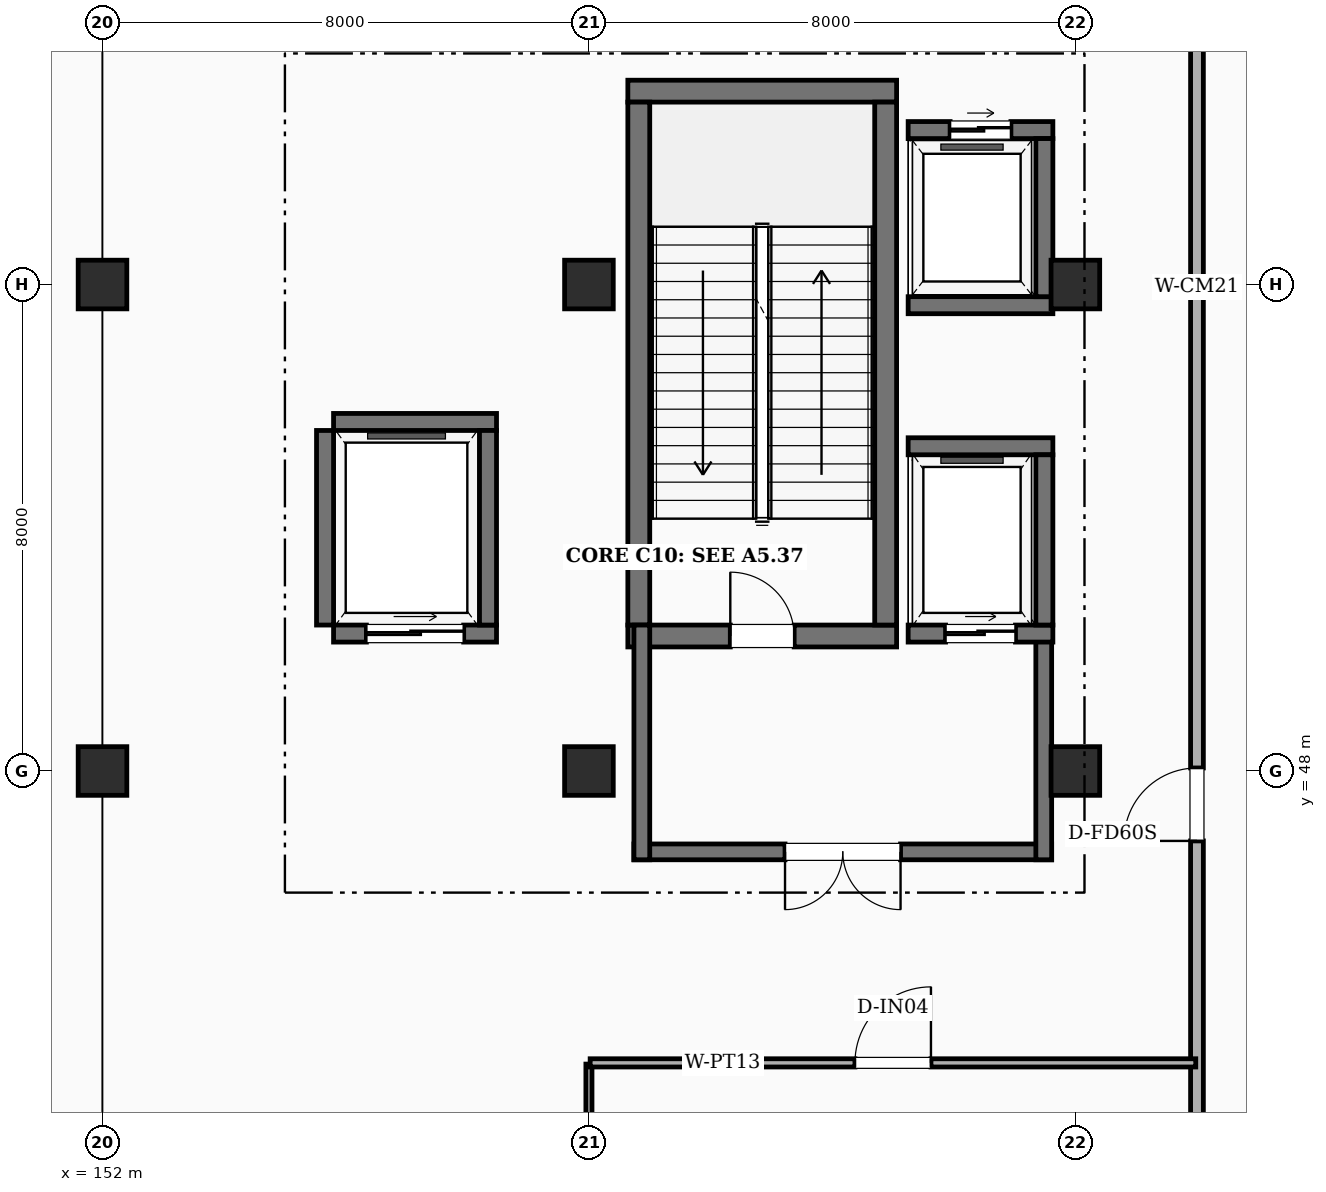
"""IFC4 building model, lengths in metres.
Left out: names, types, materials, properties, quantities, classifications, styles, units other than length and angle.
Written with IfcOpenShell. Run it as: python <this file> out.ifc"""

import sys

from ifc_helpers import new_model, si_unit, direction, frame, frame_2d, origin, origin_2d, place, context, subcontext, project, spatial, rectangle, extrude, element, fill, save


model = new_model("IFC4")
c1 = context("Model", 3, precision=1e-05, world=origin(), true_north=direction((0.0, 1.0)))
c2 = subcontext(c1, "Body", "Model", "MODEL_VIEW")
j1 = project(units=[si_unit("LENGTHUNIT", "METRE"), si_unit("PLANEANGLEUNIT", "RADIAN")], contexts=[c1])
p1 = place(None, origin())
s1 = spatial("IfcSite", under=j1, at=p1, CompositionType="ELEMENT")
p2 = place(p1, origin())
s2 = spatial("IfcBuilding", under=s1, at=p2, CompositionType="ELEMENT")
p3 = place(p2, origin())
s3 = spatial("IfcBuildingStorey", under=s2, at=p3, CompositionType="ELEMENT", Elevation=0.0)
for number, where, z_axis, x_axis in (
    (1, (152.0, 48.0, 0.0), (0.0, 0.0, 1.0), (1.0, 0.0, 0.0)),
    (2, (152.0, 56.0, 0.0), (0.0, 0.0, 1.0), (1.0, 0.0, 0.0)),
    (3, (160.0, 48.0, 0.0), (0.0, 0.0, 1.0), (1.0, 0.0, 0.0)),
    (4, (160.0, 56.0, 0.0), (0.0, 0.0, 1.0), (1.0, 0.0, 0.0)),
    (5, (168.0, 48.0, 0.0), (0.0, 0.0, 1.0), (1.0, 0.0, 0.0)),
    (6, (168.0, 56.0, 0.0), (0.0, 0.0, 1.0), (1.0, 0.0, 0.0)),
):
    element("IfcColumn", number, at=place(p3, frame(where, z_axis=z_axis, x_axis=x_axis)), inside=s3, PredefinedType="COLUMN", context=c2, shape_type="SweptSolid", body=[
        extrude(rectangle(XDim=0.8, YDim=0.8, at=origin_2d()), origin(), (0.0, 0.0, 1.0), 5.4),
    ])
p4 = place(p3, frame((160.64, 50.22, 0.0), z_axis=(0.0, 0.0, 1.0), x_axis=(1.0, 0.0, 0.0)))
e7 = element("IfcWall", 7, at=p4, inside=s3, PredefinedType="SHEAR", context=c2, shape_type="SweptSolid", body=[
    extrude(rectangle(XDim=4.42, YDim=0.36, at=frame_2d((2.21, 0.0))), origin(), (0.0, 0.0, 1.0), 5.4),
])
p5 = place(p4, frame((1.685, 0.0, 0.0)))
e8 = element("IfcOpeningElement", 8, at=p5, cuts=e7, PredefinedType="OPENING", context=c2, shape_type="SweptSolid", body=[
    extrude(rectangle(XDim=1.05, YDim=2.15, at=frame_2d((0.525, 1.075))), frame((0.0, 0.19, 0.0), z_axis=(0.0, -1.0, 0.0), x_axis=(1.0, 0.0, 0.0)), (0.0, 0.0, 1.0), 0.38),
])
p6 = place(p3, frame((160.64, 59.18, 0.0), z_axis=(0.0, 0.0, 1.0), x_axis=(1.0, 0.0, 0.0)))
e9 = element("IfcWall", 9, at=p6, inside=s3, PredefinedType="SHEAR", context=c2, shape_type="SweptSolid", body=[
    extrude(rectangle(XDim=4.42, YDim=0.36, at=frame_2d((2.21, 0.0))), origin(), (0.0, 0.0, 1.0), 5.4),
])
for number, where, z_axis, x_axis in (
    (10, (160.82, 50.4, 0.0), (0.0, 0.0, 1.0), (0.0, 1.0, 0.0)),
    (11, (164.88, 50.4, 0.0), (0.0, 0.0, 1.0), (0.0, 1.0, 0.0)),
):
    element("IfcWall", number, at=place(p3, frame(where, z_axis=z_axis, x_axis=x_axis)), inside=s3, PredefinedType="SHEAR", context=c2, shape_type="SweptSolid", body=[
        extrude(rectangle(XDim=8.6, YDim=0.36, at=frame_2d((4.3, 0.0))), origin(), (0.0, 0.0, 1.0), 5.4),
    ])
p7 = place(p3, frame((167.61, 46.67, 0.0), z_axis=(0.0, 0.0, 1.0), x_axis=(-1.0, 0.0, 0.0)))
e12 = element("IfcWall", 12, at=p7, inside=s3, PredefinedType="SHEAR", context=c2, shape_type="SweptSolid", body=[
    extrude(rectangle(XDim=6.87, YDim=0.26, at=frame_2d((3.435, 0.0))), origin(), (0.0, 0.0, 1.0), 5.4),
])
p8 = place(p7, frame((2.485, 0.0, 0.0)))
e13 = element("IfcOpeningElement", 13, at=p8, cuts=e12, PredefinedType="OPENING", context=c2, shape_type="SweptSolid", body=[
    extrude(rectangle(XDim=1.9, YDim=2.25, at=frame_2d((0.95, 1.125))), frame((0.0, 0.14, 0.0), z_axis=(0.0, -1.0, 0.0), x_axis=(1.0, 0.0, 0.0)), (0.0, 0.0, 1.0), 0.28),
])
for number, where, z_axis, x_axis in (
    (14, (160.87, 46.54, 0.0), (0.0, 0.0, 1.0), (0.0, 1.0, 0.0)),
    (15, (167.48, 46.54, 0.0), (0.0, 0.0, 1.0), (0.0, 1.0, 0.0)),
):
    element("IfcWall", number, at=place(p3, frame(where, z_axis=z_axis, x_axis=x_axis)), inside=s3, PredefinedType="SHEAR", context=c2, shape_type="SweptSolid", body=[
        extrude(rectangle(XDim=3.86, YDim=0.26, at=frame_2d((1.93, 0.0))), origin(), (0.0, 0.0, 1.0), 5.4),
    ])
p9 = place(p3, frame((165.25, 50.26, 0.0), z_axis=(0.0, 0.0, 1.0), x_axis=(1.0, 0.0, 0.0)))
e16 = element("IfcWall", 16, at=p9, inside=s3, PredefinedType="SHEAR", context=c2, shape_type="SweptSolid", body=[
    extrude(rectangle(XDim=2.38, YDim=0.28, at=frame_2d((1.19, 0.0))), origin(), (0.0, 0.0, 1.0), 5.4),
])
p10 = place(p9, frame((0.615, 0.0, 0.0)))
e17 = element("IfcOpeningElement", 17, at=p10, cuts=e16, PredefinedType="OPENING", context=c2, shape_type="SweptSolid", body=[
    extrude(rectangle(XDim=1.15, YDim=2.2, at=frame_2d((0.575, 1.1))), frame((0.0, 0.15, 0.0), z_axis=(0.0, -1.0, 0.0), x_axis=(1.0, 0.0, 0.0)), (0.0, 0.0, 1.0), 0.3),
])
p11 = place(p3, frame((165.25, 53.34, 0.0), z_axis=(0.0, 0.0, 1.0), x_axis=(1.0, 0.0, 0.0)))
e18 = element("IfcWall", 18, at=p11, inside=s3, PredefinedType="SHEAR", context=c2, shape_type="SweptSolid", body=[
    extrude(rectangle(XDim=2.38, YDim=0.28, at=frame_2d((1.19, 0.0))), origin(), (0.0, 0.0, 1.0), 5.4),
])
p12 = place(p3, frame((167.49, 50.4, 0.0), z_axis=(0.0, 0.0, 1.0), x_axis=(0.0, 1.0, 0.0)))
e19 = element("IfcWall", 19, at=p12, inside=s3, PredefinedType="SHEAR", context=c2, shape_type="SweptSolid", body=[
    extrude(rectangle(XDim=2.8, YDim=0.28, at=frame_2d((1.4, 0.0))), origin(), (0.0, 0.0, 1.0), 5.4),
])
p13 = place(p3, frame((165.25, 55.66, 0.0), z_axis=(0.0, 0.0, 1.0), x_axis=(1.0, 0.0, 0.0)))
e20 = element("IfcWall", 20, at=p13, inside=s3, PredefinedType="SHEAR", context=c2, shape_type="SweptSolid", body=[
    extrude(rectangle(XDim=2.38, YDim=0.28, at=frame_2d((1.19, 0.0))), origin(), (0.0, 0.0, 1.0), 5.4),
])
p14 = place(p3, frame((165.25, 58.54, 0.0), z_axis=(0.0, 0.0, 1.0), x_axis=(1.0, 0.0, 0.0)))
e21 = element("IfcWall", 21, at=p14, inside=s3, PredefinedType="SHEAR", context=c2, shape_type="SweptSolid", body=[
    extrude(rectangle(XDim=2.38, YDim=0.28, at=frame_2d((1.19, 0.0))), origin(), (0.0, 0.0, 1.0), 5.4),
])
p15 = place(p14, frame((0.69, 0.0, 0.0)))
e22 = element("IfcOpeningElement", 22, at=p15, cuts=e21, PredefinedType="OPENING", context=c2, shape_type="SweptSolid", body=[
    extrude(rectangle(XDim=1.0, YDim=2.15, at=frame_2d((0.5, 1.075))), frame((0.0, 0.15, 0.0), z_axis=(0.0, -1.0, 0.0), x_axis=(1.0, 0.0, 0.0)), (0.0, 0.0, 1.0), 0.3),
])
p16 = place(p3, frame((167.49, 55.8, 0.0), z_axis=(0.0, 0.0, 1.0), x_axis=(0.0, 1.0, 0.0)))
e23 = element("IfcWall", 23, at=p16, inside=s3, PredefinedType="SHEAR", context=c2, shape_type="SweptSolid", body=[
    extrude(rectangle(XDim=2.6, YDim=0.28, at=frame_2d((1.3, 0.0))), origin(), (0.0, 0.0, 1.0), 5.4),
])
p17 = place(p3, frame((155.8, 50.26, 0.0), z_axis=(0.0, 0.0, 1.0), x_axis=(1.0, 0.0, 0.0)))
e24 = element("IfcWall", 24, at=p17, inside=s3, PredefinedType="SHEAR", context=c2, shape_type="SweptSolid", body=[
    extrude(rectangle(XDim=2.68, YDim=0.28, at=frame_2d((1.34, 0.0))), origin(), (0.0, 0.0, 1.0), 5.4),
])
p18 = place(p17, frame((0.54, 0.0, 0.0)))
e25 = element("IfcOpeningElement", 25, at=p18, cuts=e24, PredefinedType="OPENING", context=c2, shape_type="SweptSolid", body=[
    extrude(rectangle(XDim=1.6, YDim=2.35, at=frame_2d((0.8, 1.175))), frame((0.0, 0.15, 0.0), z_axis=(0.0, -1.0, 0.0), x_axis=(1.0, 0.0, 0.0)), (0.0, 0.0, 1.0), 0.3),
])
p19 = place(p3, frame((155.8, 53.74, 0.0), z_axis=(0.0, 0.0, 1.0), x_axis=(1.0, 0.0, 0.0)))
e26 = element("IfcWall", 26, at=p19, inside=s3, PredefinedType="SHEAR", context=c2, shape_type="SweptSolid", body=[
    extrude(rectangle(XDim=2.68, YDim=0.28, at=frame_2d((1.34, 0.0))), origin(), (0.0, 0.0, 1.0), 5.4),
])
for number, where, z_axis, x_axis in (
    (27, (158.34, 50.4, 0.0), (0.0, 0.0, 1.0), (0.0, 1.0, 0.0)),
    (28, (155.66, 50.4, 0.0), (0.0, 0.0, 1.0), (0.0, 1.0, 0.0)),
):
    element("IfcWall", number, at=place(p3, frame(where, z_axis=z_axis, x_axis=x_axis)), inside=s3, PredefinedType="SHEAR", context=c2, shape_type="SweptSolid", body=[
        extrude(rectangle(XDim=3.2, YDim=0.28, at=frame_2d((1.6, 0.0))), origin(), (0.0, 0.0, 1.0), 5.4),
    ])
p20 = place(p3, frame((160.0, 24.02, 0.0), z_axis=(0.0, 0.0, 1.0), x_axis=(0.0, 1.0, 0.0)))
e29 = element("IfcWall", 29, at=p20, inside=s3, PredefinedType="PARTITIONING", context=c2, shape_type="SweptSolid", body=[
    extrude(rectangle(XDim=19.16, YDim=0.1, at=frame_2d((9.58, 0.0))), origin(), (0.0, 0.0, 1.0), 4.27),
])
p21 = place(p3, frame((170.0, 31.02, 0.0), z_axis=(0.0, 0.0, 1.0), x_axis=(0.0, 1.0, 0.0)))
e30 = element("IfcWall", 30, at=p21, inside=s3, PredefinedType="SOLIDWALL", context=c2, shape_type="SweptSolid", body=[
    extrude(rectangle(XDim=32.86, YDim=0.21, at=frame_2d((16.43, 0.0))), origin(), (0.0, 0.0, 1.0), 4.27),
])
p22 = place(p21, frame((15.83, 0.0, 0.0)))
e31 = element("IfcOpeningElement", 31, at=p22, cuts=e30, PredefinedType="OPENING", context=c2, shape_type="SweptSolid", body=[
    extrude(rectangle(XDim=1.2, YDim=2.15, at=frame_2d((0.6, 1.075))), frame((0.0, 0.115, 0.0), z_axis=(0.0, -1.0, 0.0), x_axis=(1.0, 0.0, 0.0)), (0.0, 0.0, 1.0), 0.23),
])
p23 = place(p3, frame((160.02, 43.2, 0.0), z_axis=(0.0, 0.0, 1.0), x_axis=(1.0, 0.0, 0.0)))
e32 = element("IfcWall", 32, at=p23, inside=s3, PredefinedType="PARTITIONING", context=c2, shape_type="SweptSolid", body=[
    extrude(rectangle(XDim=9.96, YDim=0.135, at=frame_2d((4.98, 0.0))), origin(), (0.0, 0.0, 1.0), 4.27),
])
p24 = place(p23, frame((4.355, 0.0, 0.0)))
e33 = element("IfcOpeningElement", 33, at=p24, cuts=e32, PredefinedType="OPENING", context=c2, shape_type="SweptSolid", body=[
    extrude(rectangle(XDim=1.25, YDim=2.15, at=frame_2d((0.625, 1.075))), frame((0.0, 0.077, 0.0), z_axis=(0.0, -1.0, 0.0), x_axis=(1.0, 0.0, 0.0)), (0.0, 0.0, 1.0), 0.155),
])
p25 = place(p5, origin())
e34 = element("IfcDoor", 34, at=p25, inside=s3, OperationType="SINGLE_SWING_LEFT", PredefinedType="DOOR", context=c2, shape_type="SweptSolid", body=[
    extrude(rectangle(XDim=1.05, YDim=2.15, at=frame_2d((0.525, 1.075))), frame((0.0, 0.025, 0.0), z_axis=(0.0, -1.0, 0.0), x_axis=(1.0, 0.0, 0.0)), (0.0, 0.0, 1.0), 0.05),
])
fill(e8, e34)
p26 = place(p8, origin())
e35 = element("IfcDoor", 35, at=p26, inside=s3, OperationType="DOUBLE_DOOR_SINGLE_SWING", PredefinedType="DOOR", context=c2, shape_type="SweptSolid", body=[
    extrude(rectangle(XDim=1.9, YDim=2.25, at=frame_2d((0.95, 1.125))), frame((0.0, 0.025, 0.0), z_axis=(0.0, -1.0, 0.0), x_axis=(1.0, 0.0, 0.0)), (0.0, 0.0, 1.0), 0.05),
])
fill(e13, e35)
p27 = place(p10, origin())
e36 = element("IfcDoor", 36, at=p27, inside=s3, OperationType="SLIDING_TO_LEFT", PredefinedType="DOOR", context=c2, shape_type="SweptSolid", body=[
    extrude(rectangle(XDim=1.15, YDim=2.2, at=frame_2d((0.575, 1.1))), frame((0.0, 0.025, 0.0), z_axis=(0.0, -1.0, 0.0), x_axis=(1.0, 0.0, 0.0)), (0.0, 0.0, 1.0), 0.05),
])
fill(e17, e36)
p28 = place(p15, origin())
e37 = element("IfcDoor", 37, at=p28, inside=s3, OperationType="SLIDING_TO_LEFT", PredefinedType="DOOR", context=c2, shape_type="SweptSolid", body=[
    extrude(rectangle(XDim=1.0, YDim=2.15, at=frame_2d((0.5, 1.075))), frame((0.0, 0.025, 0.0), z_axis=(0.0, -1.0, 0.0), x_axis=(1.0, 0.0, 0.0)), (0.0, 0.0, 1.0), 0.05),
])
fill(e22, e37)
p29 = place(p18, origin())
e38 = element("IfcDoor", 38, at=p29, inside=s3, OperationType="SLIDING_TO_LEFT", PredefinedType="DOOR", context=c2, shape_type="SweptSolid", body=[
    extrude(rectangle(XDim=1.6, YDim=2.35, at=frame_2d((0.8, 1.175))), frame((0.0, 0.025, 0.0), z_axis=(0.0, -1.0, 0.0), x_axis=(1.0, 0.0, 0.0)), (0.0, 0.0, 1.0), 0.05),
])
fill(e25, e38)
p30 = place(p22, origin())
e39 = element("IfcDoor", 39, at=p30, inside=s3, OperationType="SINGLE_SWING_LEFT", PredefinedType="DOOR", context=c2, shape_type="SweptSolid", body=[
    extrude(rectangle(XDim=1.2, YDim=2.15, at=frame_2d((0.6, 1.075))), frame((0.0, 0.025, 0.0), z_axis=(0.0, -1.0, 0.0), x_axis=(1.0, 0.0, 0.0)), (0.0, 0.0, 1.0), 0.05),
])
fill(e31, e39)
p31 = place(p24, origin())
e40 = element("IfcDoor", 40, at=p31, inside=s3, OperationType="SINGLE_SWING_RIGHT", PredefinedType="DOOR", context=c2, shape_type="SweptSolid", body=[
    extrude(rectangle(XDim=1.25, YDim=2.15, at=frame_2d((0.625, 1.075))), frame((0.0, 0.025, 0.0), z_axis=(0.0, -1.0, 0.0), x_axis=(1.0, 0.0, 0.0)), (0.0, 0.0, 1.0), 0.05),
])
fill(e33, e40)
save(model, sys.argv[1])
